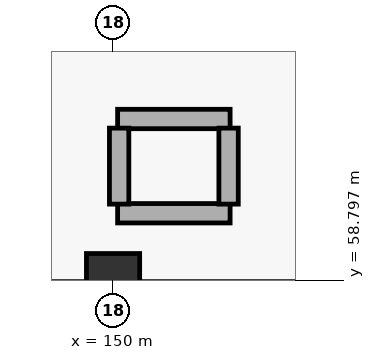
"""IFC4 building model, lengths in metres.
Left out: names, types, materials, properties, quantities, classifications, styles, units other than length and angle.
Written with IfcOpenShell. Run it as: python <this file> out.ifc"""

import sys

from ifc_helpers import new_model, si_unit, direction, frame, frame_2d, origin, origin_2d, place, context, subcontext, project, spatial, rectangle, extrude, element, save


model = new_model("IFC4")
c1 = context("Model", 3, precision=1e-05, world=origin(), true_north=direction((0.0, 1.0)))
c2 = subcontext(c1, "Body", "Model", "MODEL_VIEW")
j1 = project(units=[si_unit("LENGTHUNIT", "METRE"), si_unit("PLANEANGLEUNIT", "RADIAN")], contexts=[c1])
p1 = place(None, origin())
s1 = spatial("IfcSite", under=j1, at=p1, CompositionType="ELEMENT")
p2 = place(p1, origin())
s2 = spatial("IfcBuilding", under=s1, at=p2, CompositionType="ELEMENT")
p3 = place(p2, frame((0.0, 0.0, 20.7)))
s3 = spatial("IfcBuildingStorey", under=s2, at=p3, CompositionType="ELEMENT", Elevation=20.7)
p4 = place(p3, frame((150.0, 58.8, 0.0), z_axis=(0.0, 0.0, 1.0), x_axis=(1.0, 0.0, 0.0)))
e1 = element("IfcColumn", 1, at=p4, inside=s3, PredefinedType="COLUMN", context=c2, shape_type="SweptSolid", body=[
    extrude(rectangle(XDim=0.7, YDim=0.7, at=origin_2d()), origin(), (0.0, 0.0, 1.0), 5.7),
])
for number, where, z_axis, x_axis in (
    (2, (150.06, 60.92, 0.0), (0.0, 0.0, 1.0), (1.0, 0.0, 0.0)),
    (3, (150.06, 59.68, 0.0), (0.0, 0.0, 1.0), (1.0, 0.0, 0.0)),
):
    element("IfcWall", number, at=place(p3, frame(where, z_axis=z_axis, x_axis=x_axis)), inside=s3, PredefinedType="PARTITIONING", context=c2, shape_type="SweptSolid", body=[
        extrude(rectangle(XDim=1.48, YDim=0.255, at=frame_2d((0.74, 0.0))), origin(), (0.0, 0.0, 1.0), 4.66),
    ])
p5 = place(p3, frame((150.08, 59.8, 0.0), z_axis=(0.0, 0.0, 1.0), x_axis=(0.0, 1.0, 0.0)))
e4 = element("IfcWall", 4, at=p5, inside=s3, PredefinedType="PARTITIONING", context=c2, shape_type="SweptSolid", body=[
    extrude(rectangle(XDim=1.0, YDim=0.255, at=frame_2d((0.5, 0.0))), origin(), (0.0, 0.0, 1.0), 4.66),
])
p6 = place(p3, frame((151.52, 59.8, 0.0), z_axis=(0.0, 0.0, 1.0), x_axis=(0.0, 1.0, 0.0)))
e5 = element("IfcWall", 5, at=p6, inside=s3, PredefinedType="PARTITIONING", context=c2, shape_type="SweptSolid", body=[
    extrude(rectangle(XDim=1.0, YDim=0.255, at=frame_2d((0.5, 0.0))), origin(), (0.0, 0.0, 1.0), 4.98),
])
save(model, sys.argv[1])
